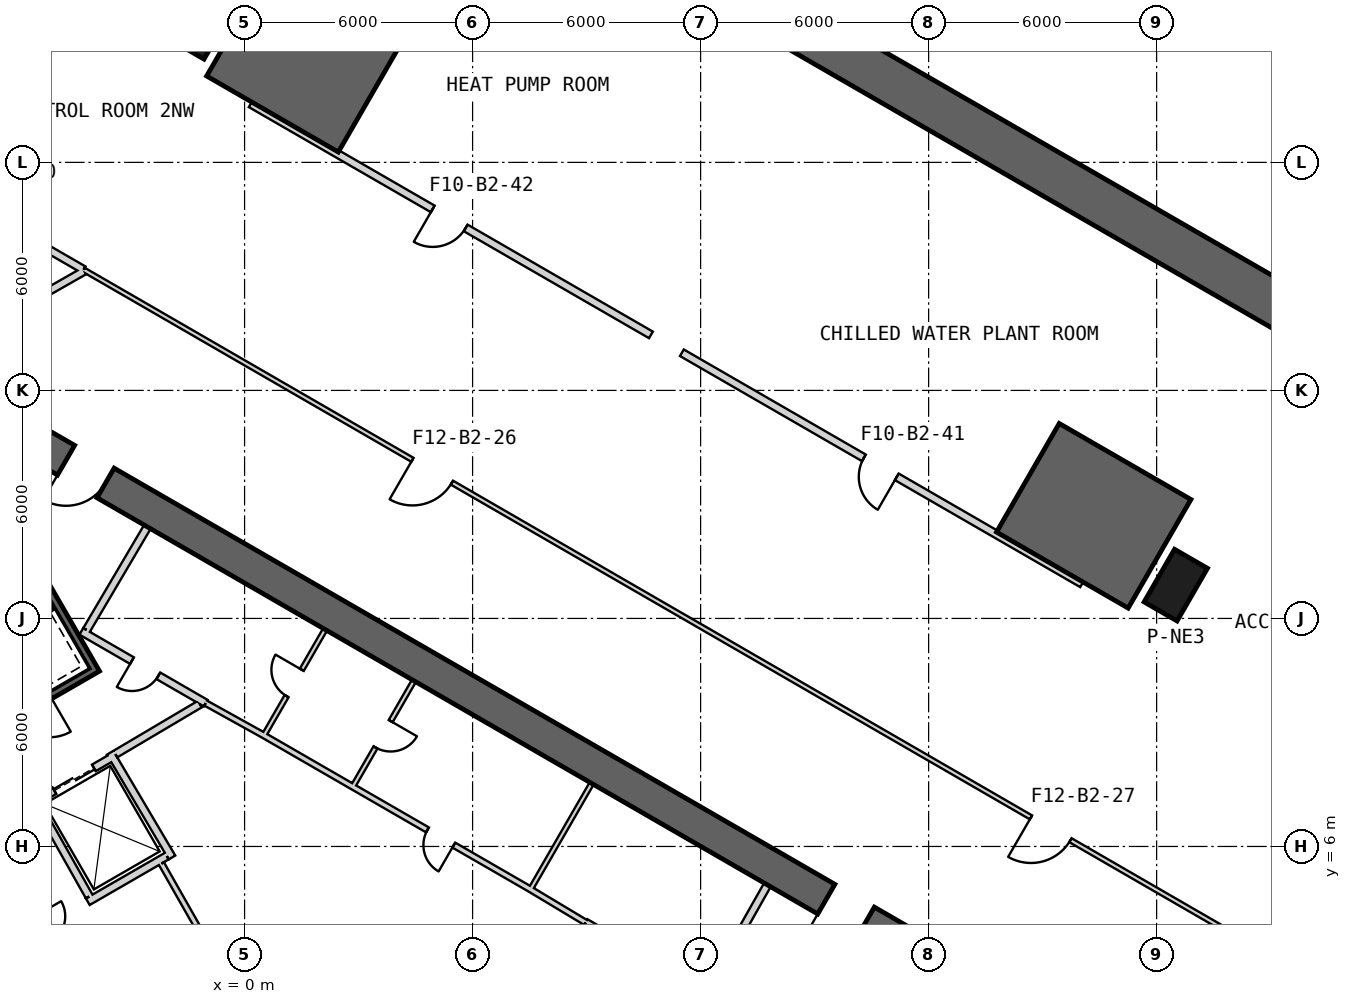
"""IFC4 building model, lengths in metres.
Left out: names, types, materials, properties, quantities, classifications, styles, units other than length and angle.
Written with IfcOpenShell. Run it as: python <this file> out.ifc"""

import sys

from ifc_helpers import new_model, si_unit, direction, frame, frame_2d, origin, origin_2d, place, context, subcontext, project, spatial, polyline, rectangle, outline, extrude, element, fill, save


model = new_model("IFC4")
c1 = context("Model", 3, precision=1e-05, world=origin(), true_north=direction((0.0, 1.0)))
c2 = subcontext(c1, "Body", "Model", "MODEL_VIEW")
j1 = project(units=[si_unit("LENGTHUNIT", "METRE"), si_unit("PLANEANGLEUNIT", "RADIAN")], contexts=[c1])
p1 = place(None, origin())
s1 = spatial("IfcSite", under=j1, at=p1, CompositionType="ELEMENT")
p2 = place(p1, origin())
s2 = spatial("IfcBuilding", under=s1, at=p2, CompositionType="ELEMENT")
p3 = place(p2, frame((0.0, 0.0, -11.0)))
s3 = spatial("IfcBuildingStorey", under=s2, at=p3, CompositionType="ELEMENT", Elevation=-11.0)
p4 = place(p3, frame((-2.593, 37.429, -0.4), z_axis=(0.0, 0.0, 1.0), x_axis=(0.866166543136, -0.499755459752, 0.0)))
e1 = element("IfcWall", 1, at=p4, inside=s3, PredefinedType="SHEAR", context=c2, shape_type="SweptSolid", body=[
    extrude(rectangle(XDim=41.622, YDim=1.2, at=frame_2d((20.811, 0.0))), origin(), (0.0, 0.0, 1.0), 5.9),
])
for number, where, z_axis, x_axis in (
    (2, (24.504, 12.876, -0.4), (0.0, 0.0, 1.0), (0.5, 0.866, 0.0)),
    (3, (-1.101, 27.659, -0.4), (0.0, 0.0, 1.0), (0.5, 0.866, 0.0)),
):
    element("IfcColumn", number, at=place(p3, frame(where, z_axis=z_axis, x_axis=x_axis)), inside=s3, PredefinedType="COLUMN", context=c2, shape_type="SweptSolid", body=[
        extrude(rectangle(XDim=1.6, YDim=1.0, at=origin_2d()), origin(), (0.0, 0.0, 1.0), 5.9),
    ])
p5 = place(p3, frame((19.475, 2.208, -0.4), z_axis=(0.0, 0.0, 1.0), x_axis=(-0.866028369851, 0.499994862586, 0.0)))
e4 = element("IfcWall", 4, at=p5, inside=s3, PredefinedType="SHEAR", context=c2, shape_type="SweptSolid", body=[
    extrude(rectangle(XDim=31.523, YDim=0.9, at=frame_2d((15.762, 0.0))), origin(), (0.0, 0.0, 1.0), 5.9),
])
p6 = place(p5, frame((3.612, 0.0, 0.4)))
e5 = element("IfcOpeningElement", 5, at=p6, cuts=e4, PredefinedType="OPENING", context=c2, shape_type="SweptSolid", body=[
    extrude(rectangle(XDim=1.2, YDim=2.4, at=frame_2d((0.6, 1.2))), frame((0.0, 0.46, 0.0), z_axis=(0.0, -1.0, 0.0), x_axis=(1.0, 0.0, 0.0)), (0.0, 0.0, 1.0), 0.92),
])
p7 = place(p5, frame((26.712, 0.0, 0.4)))
e6 = element("IfcOpeningElement", 6, at=p7, cuts=e4, PredefinedType="OPENING", context=c2, shape_type="SweptSolid", body=[
    extrude(rectangle(XDim=1.2, YDim=2.4, at=frame_2d((0.6, 1.2))), frame((0.0, 0.46, 0.0), z_axis=(0.0, -1.0, 0.0), x_axis=(1.0, 0.0, 0.0)), (0.0, 0.0, 1.0), 0.92),
])
p8 = place(p3, frame((36.087, 4.611, -0.4), z_axis=(0.0, 0.0, 1.0), x_axis=(-0.866024629043, -0.500001341888, 0.0)))
e7 = element("IfcWall", 7, at=p8, inside=s3, PredefinedType="SHEAR", context=c2, shape_type="SweptSolid", body=[
    extrude(rectangle(XDim=19.702, YDim=0.4, at=frame_2d((9.851, 0.0))), origin(), (0.0, 0.0, 1.0), 5.5),
])
p9 = place(p3, frame((0.0, 0.0, -0.4)))
e8 = element("IfcWall", 8, at=p9, inside=s3, PredefinedType="SHEAR", context=c2, shape_type="SweptSolid", body=[
    extrude(outline(polyline([(24.901, 15.13), (21.437, 17.13), (19.787, 14.272), (23.251, 12.272), (24.901, 15.13)])), origin(), (0.0, 0.0, 1.0), 5.9),
])
p10 = place(p3, frame((0.0, 0.0, -0.4)))
e9 = element("IfcWall", 9, at=p10, inside=s3, PredefinedType="SHEAR", context=c2, shape_type="SweptSolid", body=[
    extrude(outline(polyline([(4.116, 27.13), (0.652, 29.13), (-0.998, 26.272), (2.467, 24.272), (4.116, 27.13)])), origin(), (0.0, 0.0, 1.0), 5.9),
])
p11 = place(p3, frame((-7.854, 17.405, -0.4), z_axis=(0.0, 0.0, 1.0), x_axis=(0.499997992926, -0.866026562566, 0.0)))
e10 = element("IfcWall", 10, at=p11, inside=s3, PredefinedType="SHEAR", context=c2, shape_type="SweptSolid", body=[
    extrude(rectangle(XDim=7.9, YDim=0.2, at=frame_2d((3.95, 0.0))), origin(), (0.0, 0.0, 1.0), 5.5),
])
p12 = place(p3, frame((-7.159, 8.8, -0.4), z_axis=(0.0, 0.0, 1.0), x_axis=(0.866047807691, 0.499961193289, 0.0)))
e11 = element("IfcWall", 11, at=p12, inside=s3, PredefinedType="SHEAR", context=c2, shape_type="SweptSolid", body=[
    extrude(rectangle(XDim=3.6, YDim=0.2, at=frame_2d((1.8, 0.0))), origin(), (0.0, 0.0, 1.0), 5.5),
])
p13 = place(p12, frame((1.25, 0.0, 0.4)))
e12 = element("IfcOpeningElement", 12, at=p13, cuts=e11, PredefinedType="OPENING", context=c2, shape_type="SweptSolid", body=[
    extrude(rectangle(XDim=1.1, YDim=2.1, at=frame_2d((0.55, 1.05))), frame((0.0, 0.11, 0.0), z_axis=(0.0, -1.0, 0.0), x_axis=(1.0, 0.0, 0.0)), (0.0, 0.0, 1.0), 0.22),
])
p14 = place(p3, frame((-5.524, 7.168, 0.0), z_axis=(0.0, 0.0, 1.0), x_axis=(0.866024647952, 0.500001309137, 0.0)))
e13 = element("IfcWall", 13, at=p14, inside=s3, PredefinedType="PLUMBINGWALL", context=c2, shape_type="SweptSolid", body=[
    extrude(rectangle(XDim=2.4, YDim=0.2, at=frame_2d((1.2, 0.0))), origin(), (0.0, 0.0, 1.0), 5.1),
])
p15 = place(p14, frame((0.6, 0.0, 0.0)))
e14 = element("IfcOpeningElement", 14, at=p15, cuts=e13, PredefinedType="OPENING", context=c2, shape_type="SweptSolid", body=[
    extrude(rectangle(XDim=1.2, YDim=2.4, at=frame_2d((0.6, 1.2))), frame((0.0, 0.11, 0.0), z_axis=(0.0, -1.0, 0.0), x_axis=(1.0, 0.0, 0.0)), (0.0, 0.0, 1.0), 0.22),
])
p16 = place(p3, frame((-3.538, 8.465, 0.0), z_axis=(0.0, 0.0, 1.0), x_axis=(0.508616218331, -0.860993346345, 0.0)))
e15 = element("IfcWall", 15, at=p16, inside=s3, PredefinedType="PLUMBINGWALL", context=c2, shape_type="SweptSolid", body=[
    extrude(rectangle(XDim=3.2, YDim=0.2, at=frame_2d((1.6, 0.0))), origin(), (0.0, 0.0, 1.0), 5.1),
])
p17 = place(p3, frame((-2.047, 5.746, 0.0), z_axis=(0.0, 0.0, 1.0), x_axis=(-0.866024647952, -0.500001309137, 0.0)))
e16 = element("IfcWall", 16, at=p17, inside=s3, PredefinedType="PLUMBINGWALL", context=c2, shape_type="SweptSolid", body=[
    extrude(rectangle(XDim=2.4, YDim=0.2, at=frame_2d((1.2, 0.0))), origin(), (0.0, 0.0, 1.0), 5.1),
])
p18 = place(p3, frame((-5.562, 7.296, 0.0), z_axis=(0.0, 0.0, 1.0), x_axis=(0.49134651263, -0.870964180966, 0.0)))
e17 = element("IfcWall", 17, at=p18, inside=s3, PredefinedType="PLUMBINGWALL", context=c2, shape_type="SweptSolid", body=[
    extrude(rectangle(XDim=3.0, YDim=0.2, at=frame_2d((1.5, 0.0))), origin(), (0.0, 0.0, 1.0), 5.1),
])
p19 = place(p3, frame((9.133, 7.659, 0.0), z_axis=(0.0, 0.0, 1.0), x_axis=(-0.500017246033, -0.866015446554, 0.0)))
e18 = element("IfcWall", 18, at=p19, inside=s3, PredefinedType="PARTITIONING", context=c2, shape_type="SweptSolid", body=[
    extrude(rectangle(XDim=3.25, YDim=0.12, at=frame_2d((1.625, 0.0))), origin(), (0.0, 0.0, 1.0), 5.1),
])
p20 = place(p3, frame((12.11, 2.073, 0.0), z_axis=(0.0, 0.0, 1.0), x_axis=(0.49196600604, 0.870614408852, 0.0)))
e19 = element("IfcWall", 19, at=p20, inside=s3, PredefinedType="PARTITIONING", context=c2, shape_type="SweptSolid", body=[
    extrude(rectangle(XDim=3.35, YDim=0.2, at=frame_2d((1.675, 0.0))), origin(), (0.0, 0.0, 1.0), 5.1),
])
p21 = place(p3, frame((-4.296, 11.66, 0.0), z_axis=(0.0, 0.0, 1.0), x_axis=(0.866027389382, -0.499996560828, 0.0)))
e20 = element("IfcWall", 20, at=p21, inside=s3, PredefinedType="PARTITIONING", context=c2, shape_type="SweptSolid", body=[
    extrude(rectangle(XDim=3.778, YDim=0.2, at=frame_2d((1.889, 0.0))), origin(), (0.0, 0.0, 1.0), 5.1),
])
p22 = place(p21, frame((1.539, 0.0, 0.0)))
e21 = element("IfcOpeningElement", 21, at=p22, cuts=e20, PredefinedType="OPENING", context=c2, shape_type="SweptSolid", body=[
    extrude(rectangle(XDim=0.8, YDim=2.1, at=frame_2d((0.4, 1.05))), frame((0.0, 0.11, 0.0), z_axis=(0.0, -1.0, 0.0), x_axis=(1.0, 0.0, 0.0)), (0.0, 0.0, 1.0), 0.22),
])
p23 = place(p3, frame((8.974, 3.999, 0.0), z_axis=(0.0, 0.0, 1.0), x_axis=(0.86601284211, -0.500021756827, 0.0)))
e22 = element("IfcWall", 22, at=p23, inside=s3, PredefinedType="PARTITIONING", context=c2, shape_type="SweptSolid", body=[
    extrude(rectangle(XDim=3.577, YDim=0.2, at=frame_2d((1.789, 0.0))), origin(), (0.0, 0.0, 1.0), 5.1),
])
p24 = place(p23, frame((1.389, 0.0, 0.0)))
e23 = element("IfcOpeningElement", 23, at=p24, cuts=e22, PredefinedType="OPENING", context=c2, shape_type="SweptSolid", body=[
    extrude(rectangle(XDim=0.8, YDim=2.1, at=frame_2d((0.4, 1.05))), frame((0.0, 0.11, 0.0), z_axis=(0.0, -1.0, 0.0), x_axis=(1.0, 0.0, 0.0)), (0.0, 0.0, 1.0), 0.22),
])
p25 = place(p3, frame((8.975, 4.0, 0.0), z_axis=(0.0, 0.0, 1.0), x_axis=(-0.857530436795, 0.514433231791, 0.0)))
e24 = element("IfcWall", 24, at=p25, inside=s3, PredefinedType="PLUMBINGWALL", context=c2, shape_type="SweptSolid", body=[
    extrude(rectangle(XDim=1.723, YDim=0.15, at=frame_2d((0.861, 0.0))), origin(), (0.0, 0.0, 1.0), 5.1),
])
p26 = place(p3, frame((4.457, 10.359, 0.0), z_axis=(0.0, 0.0, 1.0), x_axis=(-0.500017246033, -0.866015446554, 0.0)))
e25 = element("IfcWall", 25, at=p26, inside=s3, PredefinedType="PARTITIONING", context=c2, shape_type="SweptSolid", body=[
    extrude(rectangle(XDim=3.25, YDim=0.12, at=frame_2d((1.625, 0.0))), origin(), (0.0, 0.0, 1.0), 5.1),
])
p27 = place(p26, frame((1.225, 0.0, 0.0)))
e26 = element("IfcOpeningElement", 26, at=p27, cuts=e25, PredefinedType="OPENING", context=c2, shape_type="SweptSolid", body=[
    extrude(rectangle(XDim=0.8, YDim=2.1, at=frame_2d((0.4, 1.05))), frame((0.0, 0.07, 0.0), z_axis=(0.0, -1.0, 0.0), x_axis=(1.0, 0.0, 0.0)), (0.0, 0.0, 1.0), 0.14),
])
p28 = place(p3, frame((7.497, 4.886, 0.0), z_axis=(0.0, 0.0, 1.0), x_axis=(-0.866030989016, 0.499990325971, 0.0)))
e27 = element("IfcWall", 27, at=p28, inside=s3, PredefinedType="PLUMBINGWALL", context=c2, shape_type="SweptSolid", body=[
    extrude(rectangle(XDim=8.1, YDim=0.15, at=frame_2d((4.05, 0.0))), origin(), (0.0, 0.0, 1.0), 5.1),
])
p29 = place(p28, frame((2.3, 0.0, 0.0)))
e28 = element("IfcOpeningElement", 28, at=p29, cuts=e27, PredefinedType="OPENING", context=c2, shape_type="SweptSolid", body=[
    extrude(rectangle(XDim=0.8, YDim=2.1, at=frame_2d((0.4, 1.05))), frame((0.0, 0.085, 0.0), z_axis=(0.0, -1.0, 0.0), x_axis=(1.0, 0.0, 0.0)), (0.0, 0.0, 1.0), 0.17),
])
p30 = place(p3, frame((0.494, 8.895, 0.0), z_axis=(0.0, 0.0, 1.0), x_axis=(0.500017246033, 0.866015446554, 0.0)))
e29 = element("IfcWall", 29, at=p30, inside=s3, PredefinedType="PARTITIONING", context=c2, shape_type="SweptSolid", body=[
    extrude(rectangle(XDim=3.25, YDim=0.12, at=frame_2d((1.625, 0.0))), origin(), (0.0, 0.0, 1.0), 5.1),
])
p31 = place(p30, frame((1.225, 0.0, 0.0)))
e30 = element("IfcOpeningElement", 30, at=p31, cuts=e29, PredefinedType="OPENING", context=c2, shape_type="SweptSolid", body=[
    extrude(rectangle(XDim=0.8, YDim=2.1, at=frame_2d((0.4, 1.05))), frame((0.0, 0.07, 0.0), z_axis=(0.0, -1.0, 0.0), x_axis=(1.0, 0.0, 0.0)), (0.0, 0.0, 1.0), 0.14),
])
p32 = place(p3, frame((-2.558, 14.409, 0.0), z_axis=(0.0, 0.0, 1.0), x_axis=(-0.508018930956, -0.861345903683, 0.0)))
e31 = element("IfcWall", 31, at=p32, inside=s3, PredefinedType="PARTITIONING", context=c2, shape_type="SweptSolid", body=[
    extrude(rectangle(XDim=3.15, YDim=0.2, at=frame_2d((1.575, 0.0))), origin(), (0.0, 0.0, 1.0), 5.1),
])
p33 = place(p3, frame((0.483, 8.936, 0.0), z_axis=(0.0, 0.0, 1.0), x_axis=(-0.874290944206, 0.485402250592, 0.0)))
e32 = element("IfcWall", 32, at=p33, inside=s3, PredefinedType="PLUMBINGWALL", context=c2, shape_type="SweptSolid", body=[
    extrude(rectangle(XDim=1.723, YDim=0.15, at=frame_2d((0.861, 0.0))), origin(), (0.0, 0.0, 1.0), 5.1),
])
p34 = place(p3, frame((-1.179, 9.745, 0.0), z_axis=(0.0, 0.0, 1.0), x_axis=(-0.860630814782, -0.509229418482, 0.0)))
e33 = element("IfcWall", 33, at=p34, inside=s3, PredefinedType="PARTITIONING", context=c2, shape_type="SweptSolid", body=[
    extrude(rectangle(XDim=2.582, YDim=0.2, at=frame_2d((1.291, 0.0))), origin(), (0.0, 0.0, 1.0), 5.1),
])
p35 = place(p3, frame((-2.189, 5.549, 0.0), z_axis=(0.0, 0.0, 1.0), x_axis=(0.494335077001, -0.869271437266, 0.0)))
e34 = element("IfcWall", 34, at=p35, inside=s3, PredefinedType="PLUMBINGWALL", context=c2, shape_type="SweptSolid", body=[
    extrude(rectangle(XDim=4.404, YDim=0.15, at=frame_2d((2.202, 0.0))), origin(), (0.0, 0.0, 1.0), 5.1),
])
p36 = place(p3, frame((-4.551, 2.482, 0.0), z_axis=(0.0, 0.0, 1.0), x_axis=(-0.499990139034, 0.866031096941, 0.0)))
e35 = element("IfcWall", 35, at=p36, inside=s3, PredefinedType="PLUMBINGWALL", context=c2, shape_type="SweptSolid", body=[
    extrude(rectangle(XDim=3.0, YDim=0.15, at=frame_2d((1.5, 0.0))), origin(), (0.0, 0.0, 1.0), 5.1),
])
p37 = place(p36, frame((1.137, 0.0, 0.0)))
e36 = element("IfcOpeningElement", 36, at=p37, cuts=e35, PredefinedType="OPENING", context=c2, shape_type="SweptSolid", body=[
    extrude(rectangle(XDim=0.8, YDim=2.1, at=frame_2d((0.4, 1.05))), frame((0.0, 0.085, 0.0), z_axis=(0.0, -1.0, 0.0), x_axis=(1.0, 0.0, 0.0)), (0.0, 0.0, 1.0), 0.17),
])
p38 = place(p3, frame((30.376, 1.169, 0.0), z_axis=(0.0, 0.0, 1.0), x_axis=(-0.865777000343, 0.500430000777, 0.0)))
e37 = element("IfcWall", 37, at=p38, inside=s3, PredefinedType="PARTITIONING", context=c2, shape_type="SweptSolid", body=[
    extrude(rectangle(XDim=39.978, YDim=0.12, at=frame_2d((19.989, 0.0))), origin(), (0.0, 0.0, 1.0), 4.18),
])
p39 = place(p38, frame((28.784, 0.0, 0.0)))
e38 = element("IfcOpeningElement", 38, at=p39, cuts=e37, PredefinedType="OPENING", context=c2, shape_type="SweptSolid", body=[
    extrude(rectangle(XDim=1.2, YDim=2.4, at=frame_2d((0.6, 1.2))), frame((0.0, 0.07, 0.0), z_axis=(0.0, -1.0, 0.0), x_axis=(1.0, 0.0, 0.0)), (0.0, 0.0, 1.0), 0.14),
])
p40 = place(p38, frame((9.984, 0.0, 0.0)))
e39 = element("IfcOpeningElement", 39, at=p40, cuts=e37, PredefinedType="OPENING", context=c2, shape_type="SweptSolid", body=[
    extrude(rectangle(XDim=1.2, YDim=2.4, at=frame_2d((0.6, 1.2))), frame((0.0, 0.07, 0.0), z_axis=(0.0, -1.0, 0.0), x_axis=(1.0, 0.0, 0.0)), (0.0, 0.0, 1.0), 0.14),
])
p41 = place(p3, frame((-4.236, 21.175, 0.0), z_axis=(0.0, 0.0, 1.0), x_axis=(-0.86602711848, 0.499997030048, 0.0)))
e40 = element("IfcWall", 40, at=p41, inside=s3, PredefinedType="PARTITIONING", context=c2, shape_type="SweptSolid", body=[
    extrude(rectangle(XDim=6.901, YDim=0.2, at=frame_2d((3.451, 0.0))), origin(), (0.0, 0.0, 1.0), 4.18),
])
p42 = place(p41, frame((2.907, 0.0, 0.0)))
e41 = element("IfcOpeningElement", 41, at=p42, cuts=e40, PredefinedType="OPENING", context=c2, shape_type="SweptSolid", body=[
    extrude(rectangle(XDim=1.0, YDim=2.1, at=frame_2d((0.5, 1.05))), frame((0.0, 0.11, 0.0), z_axis=(0.0, -1.0, 0.0), x_axis=(1.0, 0.0, 0.0)), (0.0, 0.0, 1.0), 0.22),
])
p43 = place(p3, frame((22.038, 12.911, 0.0), z_axis=(0.0, 0.0, 1.0), x_axis=(-0.866020417952, 0.500008635616, 0.0)))
e42 = element("IfcWall", 42, at=p43, inside=s3, PredefinedType="PARTITIONING", context=c2, shape_type="SweptSolid", body=[
    extrude(rectangle(XDim=12.16, YDim=0.2, at=frame_2d((6.08, 0.0))), origin(), (0.0, 0.0, 1.0), 5.1),
])
p44 = place(p43, frame((5.63, 0.0, 0.0)))
e43 = element("IfcOpeningElement", 43, at=p44, cuts=e42, PredefinedType="OPENING", context=c2, shape_type="SweptSolid", body=[
    extrude(rectangle(XDim=1.0, YDim=2.1, at=frame_2d((0.5, 1.05))), frame((0.0, 0.11, 0.0), z_axis=(0.0, -1.0, 0.0), x_axis=(1.0, 0.0, 0.0)), (0.0, 0.0, 1.0), 0.22),
])
p45 = place(p3, frame((10.693, 19.461, 0.0), z_axis=(0.0, 0.0, 1.0), x_axis=(-0.866020417952, 0.500008635616, 0.0)))
e44 = element("IfcWall", 44, at=p45, inside=s3, PredefinedType="PARTITIONING", context=c2, shape_type="SweptSolid", body=[
    extrude(rectangle(XDim=12.16, YDim=0.2, at=frame_2d((6.08, 0.0))), origin(), (0.0, 0.0, 1.0), 5.1),
])
p46 = place(p45, frame((5.63, 0.0, 0.0)))
e45 = element("IfcOpeningElement", 45, at=p46, cuts=e44, PredefinedType="OPENING", context=c2, shape_type="SweptSolid", body=[
    extrude(rectangle(XDim=1.0, YDim=2.1, at=frame_2d((0.5, 1.05))), frame((0.0, 0.11, 0.0), z_axis=(0.0, -1.0, 0.0), x_axis=(1.0, 0.0, 0.0)), (0.0, 0.0, 1.0), 0.22),
])
p47 = place(p3, frame((-4.22, 21.143, 0.0), z_axis=(0.0, 0.0, 1.0), x_axis=(-0.868530929613, -0.495634970825, 0.0)))
e46 = element("IfcWall", 46, at=p47, inside=s3, PredefinedType="PARTITIONING", context=c2, shape_type="SweptSolid", body=[
    extrude(rectangle(XDim=5.166, YDim=0.2, at=frame_2d((2.583, 0.0))), origin(), (0.0, 0.0, 1.0), 4.18),
])
p48 = place(p15, origin())
e47 = element("IfcDoor", 47, at=p48, inside=s3, OperationType="SLIDING_TO_LEFT", PredefinedType="USERDEFINED", context=c2, shape_type="SweptSolid", body=[
    extrude(rectangle(XDim=1.2, YDim=2.4, at=frame_2d((0.6, 1.2))), frame((0.0, 0.025, 0.0), z_axis=(0.0, -1.0, 0.0), x_axis=(1.0, 0.0, 0.0)), (0.0, 0.0, 1.0), 0.05),
])
fill(e14, e47)
p49 = place(p27, origin())
e48 = element("IfcDoor", 48, at=p49, inside=s3, OperationType="SINGLE_SWING_LEFT", PredefinedType="USERDEFINED", context=c2, shape_type="SweptSolid", body=[
    extrude(rectangle(XDim=0.8, YDim=2.1, at=frame_2d((0.4, 1.05))), frame((0.0, 0.025, 0.0), z_axis=(0.0, -1.0, 0.0), x_axis=(1.0, 0.0, 0.0)), (0.0, 0.0, 1.0), 0.05),
])
fill(e26, e48)
p50 = place(p22, origin())
e49 = element("IfcDoor", 49, at=p50, inside=s3, OperationType="SINGLE_SWING_LEFT", PredefinedType="USERDEFINED", context=c2, shape_type="SweptSolid", body=[
    extrude(rectangle(XDim=0.8, YDim=2.1, at=frame_2d((0.4, 1.05))), frame((0.0, 0.025, 0.0), z_axis=(0.0, -1.0, 0.0), x_axis=(1.0, 0.0, 0.0)), (0.0, 0.0, 1.0), 0.05),
])
fill(e21, e49)
p51 = place(p29, origin())
e50 = element("IfcDoor", 50, at=p51, inside=s3, OperationType="SINGLE_SWING_LEFT", PredefinedType="USERDEFINED", context=c2, shape_type="SweptSolid", body=[
    extrude(rectangle(XDim=0.8, YDim=2.1, at=frame_2d((0.4, 1.05))), frame((0.0, 0.025, 0.0), z_axis=(0.0, -1.0, 0.0), x_axis=(1.0, 0.0, 0.0)), (0.0, 0.0, 1.0), 0.05),
])
fill(e28, e50)
p52 = place(p31, origin())
e51 = element("IfcDoor", 51, at=p52, inside=s3, OperationType="SINGLE_SWING_RIGHT", PredefinedType="USERDEFINED", context=c2, shape_type="SweptSolid", body=[
    extrude(rectangle(XDim=0.8, YDim=2.1, at=frame_2d((0.4, 1.05))), frame((0.0, 0.025, 0.0), z_axis=(0.0, -1.0, 0.0), x_axis=(1.0, 0.0, 0.0)), (0.0, 0.0, 1.0), 0.05),
])
fill(e30, e51)
p53 = place(p39, origin())
e52 = element("IfcDoor", 52, at=p53, inside=s3, OperationType="SINGLE_SWING_RIGHT", PredefinedType="USERDEFINED", context=c2, shape_type="SweptSolid", body=[
    extrude(rectangle(XDim=1.2, YDim=2.4, at=frame_2d((0.6, 1.2))), frame((0.0, 0.025, 0.0), z_axis=(0.0, -1.0, 0.0), x_axis=(1.0, 0.0, 0.0)), (0.0, 0.0, 1.0), 0.05),
])
fill(e38, e52)
p54 = place(p40, origin())
e53 = element("IfcDoor", 53, at=p54, inside=s3, OperationType="SINGLE_SWING_RIGHT", PredefinedType="USERDEFINED", context=c2, shape_type="SweptSolid", body=[
    extrude(rectangle(XDim=1.2, YDim=2.4, at=frame_2d((0.6, 1.2))), frame((0.0, 0.025, 0.0), z_axis=(0.0, -1.0, 0.0), x_axis=(1.0, 0.0, 0.0)), (0.0, 0.0, 1.0), 0.05),
])
fill(e39, e53)
p55 = place(p44, origin())
e54 = element("IfcDoor", 54, at=p55, inside=s3, OperationType="SINGLE_SWING_LEFT", PredefinedType="USERDEFINED", context=c2, shape_type="SweptSolid", body=[
    extrude(rectangle(XDim=1.0, YDim=2.1, at=frame_2d((0.5, 1.05))), frame((0.0, 0.025, 0.0), z_axis=(0.0, -1.0, 0.0), x_axis=(1.0, 0.0, 0.0)), (0.0, 0.0, 1.0), 0.05),
])
fill(e43, e54)
p56 = place(p46, origin())
e55 = element("IfcDoor", 55, at=p56, inside=s3, OperationType="SINGLE_SWING_RIGHT", PredefinedType="USERDEFINED", context=c2, shape_type="SweptSolid", body=[
    extrude(rectangle(XDim=1.0, YDim=2.1, at=frame_2d((0.5, 1.05))), frame((0.0, 0.025, 0.0), z_axis=(0.0, -1.0, 0.0), x_axis=(1.0, 0.0, 0.0)), (0.0, 0.0, 1.0), 0.05),
])
fill(e45, e55)
p57 = place(p6, origin())
e56 = element("IfcDoor", 56, at=p57, inside=s3, OperationType="SINGLE_SWING_RIGHT", PredefinedType="USERDEFINED", context=c2, shape_type="SweptSolid", body=[
    extrude(rectangle(XDim=1.2, YDim=2.4, at=frame_2d((0.6, 1.2))), frame((0.0, 0.025, 0.0), z_axis=(0.0, -1.0, 0.0), x_axis=(1.0, 0.0, 0.0)), (0.0, 0.0, 1.0), 0.05),
])
fill(e5, e56)
p58 = place(p7, origin())
e57 = element("IfcDoor", 57, at=p58, inside=s3, OperationType="SINGLE_SWING_RIGHT", PredefinedType="USERDEFINED", context=c2, shape_type="SweptSolid", body=[
    extrude(rectangle(XDim=1.2, YDim=2.4, at=frame_2d((0.6, 1.2))), frame((0.0, 0.025, 0.0), z_axis=(0.0, -1.0, 0.0), x_axis=(1.0, 0.0, 0.0)), (0.0, 0.0, 1.0), 0.05),
])
fill(e6, e57)
save(model, sys.argv[1])
